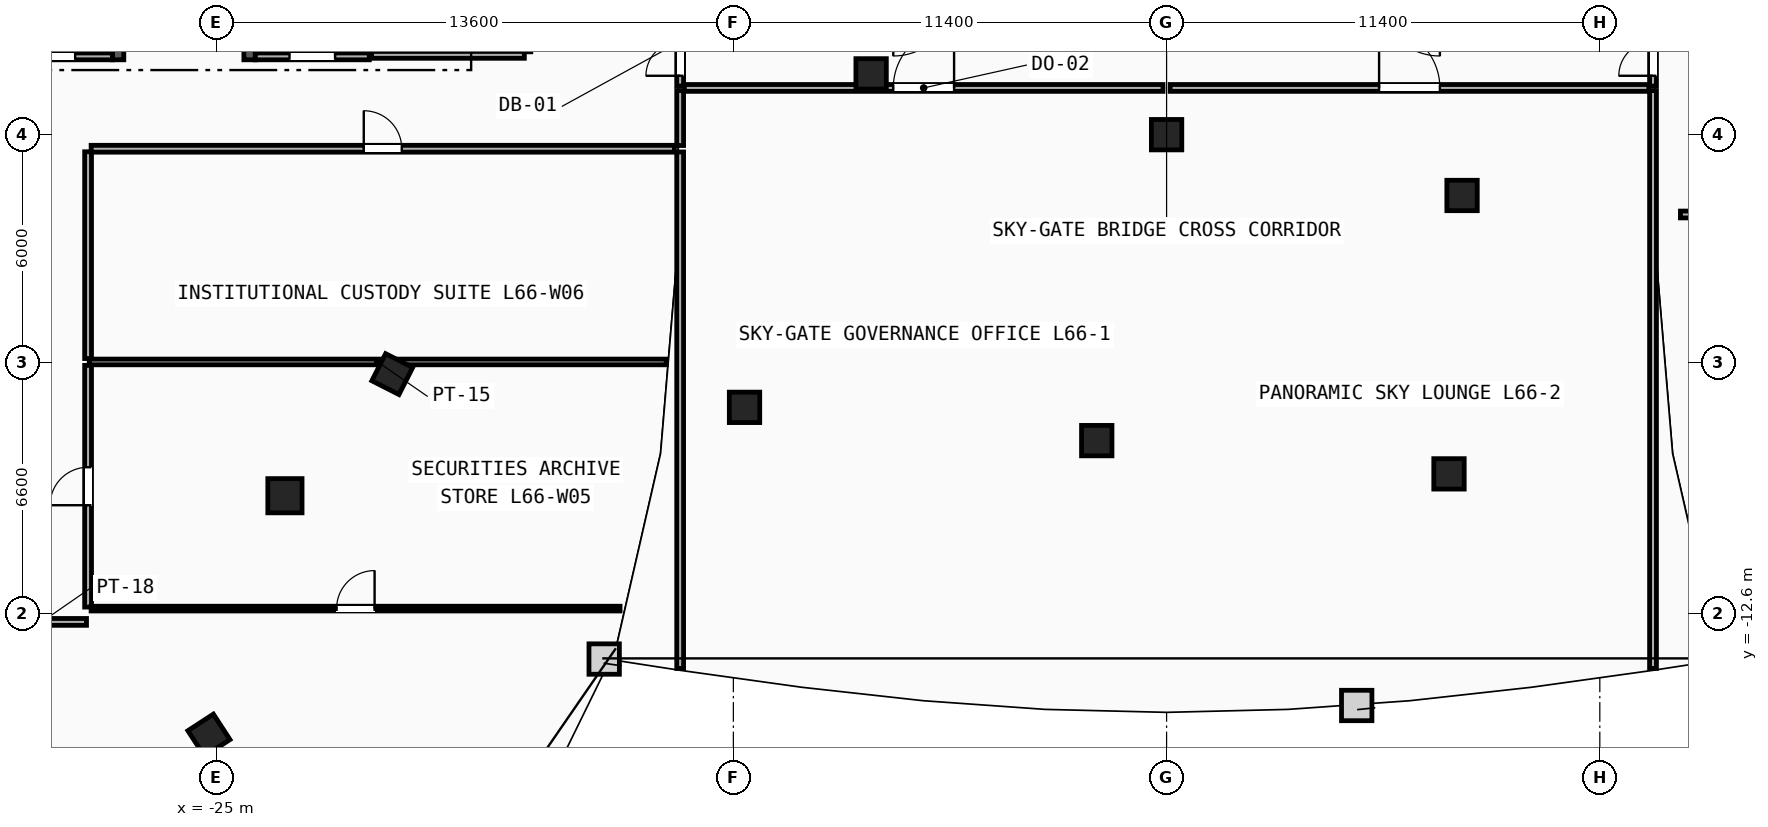
"""IFC4 building model, lengths in metres.
Left out: names, types, materials, properties, quantities, classifications, styles, units other than length and angle.
Written with IfcOpenShell. Run it as: python <this file> out.ifc"""

import sys

from ifc_helpers import new_model, si_unit, direction, frame, frame_2d, origin, origin_2d, place, context, subcontext, project, spatial, rectangle, extrude, element, fill, save


model = new_model("IFC4")
c1 = context("Model", 3, precision=1e-05, world=origin(), true_north=direction((0.0, 1.0)))
c2 = subcontext(c1, "Body", "Model", "MODEL_VIEW")
j1 = project(units=[si_unit("LENGTHUNIT", "METRE"), si_unit("PLANEANGLEUNIT", "RADIAN")], contexts=[c1])
p1 = place(None, origin())
s1 = spatial("IfcSite", under=j1, at=p1, CompositionType="ELEMENT")
p2 = place(p1, origin())
s2 = spatial("IfcBuilding", under=s1, at=p2, CompositionType="ELEMENT")
p3 = place(p2, frame((0.0, 0.0, 250.4)))
s3 = spatial("IfcBuildingStorey", under=s2, at=p3, CompositionType="ELEMENT", Elevation=250.4)
p4 = place(p3, frame((-23.2, -9.5, 0.0), z_axis=(0.0, 0.0, 1.0), x_axis=(1.0, 0.0, 0.0)))
e1 = element("IfcColumn", 1, at=p4, inside=s3, PredefinedType="COLUMN", context=c2, shape_type="SweptSolid", body=[
    extrude(rectangle(XDim=0.9, YDim=0.9, at=origin_2d()), origin(), (0.0, 0.0, 1.0), 3.6),
])
for number, where, z_axis, x_axis in (
    (2, (-25.2, -15.8, 0.0), (0.0, 0.0, 1.0), (0.838, 0.546, 0.0)),
    (3, (-20.375, -6.3, 0.0), (0.0, 0.0, 1.0), (0.453, 0.892, 0.0)),
    (4, (-11.106, -7.175, 0.0), (0.0, 0.0, 1.0), (1.0, 0.0, 0.0)),
    (5, (-1.837, -8.05, 0.0), (0.0, 0.0, 1.0), (1.0, 0.0, 0.0)),
    (6, (7.431, -8.925, 0.0), (0.0, 0.0, 1.0), (1.0, 0.0, 0.0)),
    (7, (-7.775, 1.6, 0.0), (0.0, 0.0, 1.0), (1.0, 0.0, 0.0)),
    (8, (0.0, 0.0, 0.0), (0.0, 0.0, 1.0), (1.0, 0.0, 0.0)),
    (9, (7.775, -1.6, 0.0), (0.0, 0.0, 1.0), (1.0, 0.0, 0.0)),
):
    element("IfcColumn", number, at=place(p3, frame(where, z_axis=z_axis, x_axis=x_axis)), inside=s3, PredefinedType="COLUMN", context=c2, shape_type="SweptSolid", body=[
        extrude(rectangle(XDim=0.8, YDim=0.8, at=origin_2d()), origin(), (0.0, 0.0, 1.0), 3.6),
    ])
for number, where, z_axis, x_axis in (
    (10, (-27.59, 1.97, 0.0), (0.0, 0.0, 1.0), (0.0, 1.0, 0.0)),
    (11, (-24.13, 1.97, 0.0), (0.0, 0.0, 1.0), (0.0, 1.0, 0.0)),
):
    element("IfcWall", number, at=place(p3, frame(where, z_axis=z_axis, x_axis=x_axis)), inside=s3, PredefinedType="SHEAR", context=c2, shape_type="SweptSolid", body=[
        extrude(rectangle(XDim=10.68, YDim=0.3, at=frame_2d((5.34, 0.0))), origin(), (0.0, 0.0, 1.0), 3.34),
    ])
p5 = place(p3, frame((-20.89, 2.15, 0.0), z_axis=(0.0, 0.0, 1.0), x_axis=(0.0, 1.0, 0.0)))
e12 = element("IfcWall", 12, at=p5, inside=s3, PredefinedType="PARTITIONING", context=c2, shape_type="SweptSolid", body=[
    extrude(rectangle(XDim=5.3, YDim=0.18, at=frame_2d((2.65, 0.0))), origin(), (0.0, 0.0, 1.0), 3.34),
])
p6 = place(p3, frame((-23.98, 2.06, 0.0), z_axis=(0.0, 0.0, 1.0), x_axis=(1.0, 0.0, 0.0)))
e13 = element("IfcWall", 13, at=p6, inside=s3, PredefinedType="PARTITIONING", context=c2, shape_type="SweptSolid", body=[
    extrude(rectangle(XDim=3.0, YDim=0.18, at=frame_2d((1.5, 0.0))), origin(), (0.0, 0.0, 1.0), 3.34),
])
p7 = place(p6, frame((0.9, 0.0, 0.0)))
e14 = element("IfcOpeningElement", 14, at=p7, cuts=e13, PredefinedType="OPENING", context=c2, shape_type="SweptSolid", body=[
    extrude(rectangle(XDim=1.2, YDim=2.15, at=frame_2d((0.6, 1.075))), frame((0.0, 0.1, 0.0), z_axis=(0.0, -1.0, 0.0), x_axis=(1.0, 0.0, 0.0)), (0.0, 0.0, 1.0), 0.2),
])
p8 = place(p3, frame((-30.9, 2.06, 0.0), z_axis=(0.0, 0.0, 1.0), x_axis=(1.0, 0.0, 0.0)))
e15 = element("IfcWall", 15, at=p8, inside=s3, PredefinedType="PARTITIONING", context=c2, shape_type="SweptSolid", body=[
    extrude(rectangle(XDim=3.16, YDim=0.18, at=frame_2d((1.58, 0.0))), origin(), (0.0, 0.0, 1.0), 3.34),
])
p9 = place(p8, frame((0.98, 0.0, 0.0)))
e16 = element("IfcOpeningElement", 16, at=p9, cuts=e15, PredefinedType="OPENING", context=c2, shape_type="SweptSolid", body=[
    extrude(rectangle(XDim=1.2, YDim=2.15, at=frame_2d((0.6, 1.075))), frame((0.0, 0.1, 0.0), z_axis=(0.0, -1.0, 0.0), x_axis=(1.0, 0.0, 0.0)), (0.0, 0.0, 1.0), 0.2),
])
p10 = place(p3, frame((-28.35, -5.98, 0.0), z_axis=(0.0, 0.0, 1.0), x_axis=(1.0, 0.0, 0.0)))
e17 = element("IfcWall", 17, at=p10, inside=s3, PredefinedType="PARTITIONING", context=c2, shape_type="SweptSolid", body=[
    extrude(rectangle(XDim=15.185, YDim=0.15, at=frame_2d((7.593, 0.0))), origin(), (0.0, 0.0, 1.0), 3.34),
])
p11 = place(p3, frame((-30.779, -12.82, 0.0), z_axis=(0.0, 0.0, 1.0), x_axis=(1.0, 0.0, 0.0)))
e18 = element("IfcWall", 18, at=p11, inside=s3, PredefinedType="PARTITIONING", context=c2, shape_type="SweptSolid", body=[
    extrude(rectangle(XDim=2.357, YDim=0.18, at=frame_2d((1.179, 0.0))), origin(), (0.0, 0.0, 1.0), 3.34),
])
p12 = place(p3, frame((-28.38, -12.43, 0.0), z_axis=(0.0, 0.0, 1.0), x_axis=(0.0, 1.0, 0.0)))
e19 = element("IfcWall", 19, at=p12, inside=s3, PredefinedType="PARTITIONING", context=c2, shape_type="SweptSolid", body=[
    extrude(rectangle(XDim=6.36, YDim=0.18, at=frame_2d((3.18, 0.0))), origin(), (0.0, 0.0, 1.0), 3.34),
])
p13 = place(p12, frame((2.68, 0.0, 0.0)))
e20 = element("IfcOpeningElement", 20, at=p13, cuts=e19, PredefinedType="OPENING", context=c2, shape_type="SweptSolid", body=[
    extrude(rectangle(XDim=1.0, YDim=2.15, at=frame_2d((0.5, 1.075))), frame((0.0, 0.1, 0.0), z_axis=(0.0, -1.0, 0.0), x_axis=(1.0, 0.0, 0.0)), (0.0, 0.0, 1.0), 0.2),
])
p14 = place(p3, frame((-28.3, -0.37, 0.0), z_axis=(0.0, 0.0, 1.0), x_axis=(1.0, 0.0, 0.0)))
e21 = element("IfcWall", 21, at=p14, inside=s3, PredefinedType="PARTITIONING", context=c2, shape_type="SweptSolid", body=[
    extrude(rectangle(XDim=15.349, YDim=0.18, at=frame_2d((7.675, 0.0))), origin(), (0.0, 0.0, 1.0), 3.34),
])
p15 = place(p14, frame((7.175, 0.0, 0.0)))
e22 = element("IfcOpeningElement", 22, at=p15, cuts=e21, PredefinedType="OPENING", context=c2, shape_type="SweptSolid", body=[
    extrude(rectangle(XDim=1.0, YDim=2.15, at=frame_2d((0.5, 1.075))), frame((0.0, 0.1, 0.0), z_axis=(0.0, -1.0, 0.0), x_axis=(1.0, 0.0, 0.0)), (0.0, 0.0, 1.0), 0.2),
])
p16 = place(p3, frame((-28.38, -5.89, 0.0), z_axis=(0.0, 0.0, 1.0), x_axis=(0.0, 1.0, 0.0)))
e23 = element("IfcWall", 23, at=p16, inside=s3, PredefinedType="PARTITIONING", context=c2, shape_type="SweptSolid", body=[
    extrude(rectangle(XDim=5.44, YDim=0.18, at=frame_2d((2.72, 0.0))), origin(), (0.0, 0.0, 1.0), 3.34),
])
p17 = place(p3, frame((-16.9, 2.1, 0.0), z_axis=(0.0, 0.0, 1.0), x_axis=(-1.0, 0.0, 0.0)))
e24 = element("IfcWall", 24, at=p17, inside=s3, PredefinedType="PARTITIONING", context=c2, shape_type="SweptSolid", body=[
    extrude(rectangle(XDim=4.02, YDim=0.18, at=frame_2d((2.01, 0.0))), origin(), (0.0, 0.0, 1.0), 3.34),
])
p18 = place(p3, frame((-28.3, -12.47, 0.0), z_axis=(0.0, 0.0, 1.0), x_axis=(1.0, 0.0, 0.0)))
e25 = element("IfcWall", 25, at=p18, inside=s3, PredefinedType="PARTITIONING", context=c2, shape_type="SweptSolid", body=[
    extrude(rectangle(XDim=13.919, YDim=0.125, at=frame_2d((6.959, 0.0))), origin(), (0.0, 0.0, 1.0), 3.34),
])
p19 = place(p18, frame((6.459, 0.0, 0.0)))
e26 = element("IfcOpeningElement", 26, at=p19, cuts=e25, PredefinedType="OPENING", context=c2, shape_type="SweptSolid", body=[
    extrude(rectangle(XDim=1.0, YDim=2.15, at=frame_2d((0.5, 1.075))), frame((0.0, 0.073, 0.0), z_axis=(0.0, -1.0, 0.0), x_axis=(1.0, 0.0, 0.0)), (0.0, 0.0, 1.0), 0.145),
])
p20 = place(p3, frame((13.521, -2.1, 0.0), z_axis=(0.0, 0.0, 1.0), x_axis=(1.0, 0.0, 0.0)))
e27 = element("IfcWall", 27, at=p20, inside=s3, PredefinedType="PARTITIONING", context=c2, shape_type="SweptSolid", body=[
    extrude(rectangle(XDim=7.398, YDim=0.18, at=frame_2d((3.699, 0.0))), origin(), (0.0, 0.0, 1.0), 3.34),
])
p21 = place(p3, frame((-12.688, 1.23, 0.0), z_axis=(0.0, 0.0, 1.0), x_axis=(1.0, 0.0, 0.0)))
e28 = element("IfcWall", 28, at=p21, inside=s3, PredefinedType="PARTITIONING", context=c2, shape_type="SweptSolid", body=[
    extrude(rectangle(XDim=12.594, YDim=0.18, at=frame_2d((6.297, 0.0))), origin(), (0.0, 0.0, 1.0), 2.663),
])
p22 = place(p21, frame((5.497, 0.0, 0.0)))
e29 = element("IfcOpeningElement", 29, at=p22, cuts=e28, PredefinedType="OPENING", context=c2, shape_type="SweptSolid", body=[
    extrude(rectangle(XDim=1.6, YDim=2.2, at=frame_2d((0.8, 1.1))), frame((0.0, 0.1, 0.0), z_axis=(0.0, -1.0, 0.0), x_axis=(1.0, 0.0, 0.0)), (0.0, 0.0, 1.0), 0.2),
])
p23 = place(p3, frame((0.095, 1.23, 0.0), z_axis=(0.0, 0.0, 1.0), x_axis=(1.0, 0.0, 0.0)))
e30 = element("IfcWall", 30, at=p23, inside=s3, PredefinedType="PARTITIONING", context=c2, shape_type="SweptSolid", body=[
    extrude(rectangle(XDim=12.594, YDim=0.18, at=frame_2d((6.297, 0.0))), origin(), (0.0, 0.0, 1.0), 3.34),
])
p24 = place(p23, frame((5.497, 0.0, 0.0)))
e31 = element("IfcOpeningElement", 31, at=p24, cuts=e30, PredefinedType="OPENING", context=c2, shape_type="SweptSolid", body=[
    extrude(rectangle(XDim=1.6, YDim=2.2, at=frame_2d((0.8, 1.1))), frame((0.0, 0.1, 0.0), z_axis=(0.0, -1.0, 0.0), x_axis=(1.0, 0.0, 0.0)), (0.0, 0.0, 1.0), 0.2),
])
p25 = place(p3, frame((-12.8, -14.044, 0.0), z_axis=(0.0, 0.0, 1.0), x_axis=(0.0, 1.0, 0.0)))
e32 = element("IfcWall", 32, at=p25, inside=s3, PredefinedType="PARTITIONING", context=c2, shape_type="SweptSolid", body=[
    extrude(rectangle(XDim=13.589, YDim=0.18, at=frame_2d((6.794, 0.0))), origin(), (0.0, 0.0, 1.0), 3.34),
])
p26 = place(p3, frame((-12.8, -0.285, 0.0), z_axis=(0.0, 0.0, 1.0), x_axis=(0.0, 1.0, 0.0)))
e33 = element("IfcWall", 33, at=p26, inside=s3, PredefinedType="PARTITIONING", context=c2, shape_type="SweptSolid", body=[
    extrude(rectangle(XDim=1.445, YDim=0.18, at=frame_2d((0.722, 0.0))), origin(), (0.0, 0.0, 1.0), 3.34),
])
p27 = place(p3, frame((-12.8, 1.28, 0.0), z_axis=(0.0, 0.0, 1.0), x_axis=(0.0, 1.0, 0.0)))
e34 = element("IfcWall", 34, at=p27, inside=s3, PredefinedType="PARTITIONING", context=c2, shape_type="SweptSolid", body=[
    extrude(rectangle(XDim=2.34, YDim=0.18, at=frame_2d((1.17, 0.0))), origin(), (0.0, 0.0, 1.0), 3.34),
])
p28 = place(p27, frame((0.27, 0.0, 0.0)))
e35 = element("IfcOpeningElement", 35, at=p28, cuts=e34, PredefinedType="OPENING", context=c2, shape_type="SweptSolid", body=[
    extrude(rectangle(XDim=1.8, YDim=2.25, at=frame_2d((0.9, 1.125))), frame((0.0, 0.1, 0.0), z_axis=(0.0, -1.0, 0.0), x_axis=(1.0, 0.0, 0.0)), (0.0, 0.0, 1.0), 0.2),
])
p29 = place(p3, frame((12.8, -14.044, 0.0), z_axis=(0.0, 0.0, 1.0), x_axis=(0.0, 1.0, 0.0)))
e36 = element("IfcWall", 36, at=p29, inside=s3, PredefinedType="PARTITIONING", context=c2, shape_type="SweptSolid", body=[
    extrude(rectangle(XDim=15.204, YDim=0.18, at=frame_2d((7.602, 0.0))), origin(), (0.0, 0.0, 1.0), 3.34),
])
p30 = place(p3, frame((12.8, 1.28, 0.0), z_axis=(0.0, 0.0, 1.0), x_axis=(0.0, 1.0, 0.0)))
e37 = element("IfcWall", 37, at=p30, inside=s3, PredefinedType="PARTITIONING", context=c2, shape_type="SweptSolid", body=[
    extrude(rectangle(XDim=2.34, YDim=0.18, at=frame_2d((1.17, 0.0))), origin(), (0.0, 0.0, 1.0), 3.34),
])
p31 = place(p30, frame((0.27, 0.0, 0.0)))
e38 = element("IfcOpeningElement", 38, at=p31, cuts=e37, PredefinedType="OPENING", context=c2, shape_type="SweptSolid", body=[
    extrude(rectangle(XDim=1.8, YDim=2.25, at=frame_2d((0.9, 1.125))), frame((0.0, 0.1, 0.0), z_axis=(0.0, -1.0, 0.0), x_axis=(1.0, 0.0, 0.0)), (0.0, 0.0, 1.0), 0.2),
])
p32 = place(p7, origin())
e39 = element("IfcDoor", 39, at=p32, inside=s3, OperationType="SINGLE_SWING_RIGHT", PredefinedType="DOOR", context=c2, shape_type="SweptSolid", body=[
    extrude(rectangle(XDim=1.2, YDim=2.15, at=frame_2d((0.6, 1.075))), frame((0.0, 0.025, 0.0), z_axis=(0.0, -1.0, 0.0), x_axis=(1.0, 0.0, 0.0)), (0.0, 0.0, 1.0), 0.05),
])
fill(e14, e39)
p33 = place(p9, origin())
e40 = element("IfcDoor", 40, at=p33, inside=s3, OperationType="SINGLE_SWING_LEFT", PredefinedType="DOOR", context=c2, shape_type="SweptSolid", body=[
    extrude(rectangle(XDim=1.2, YDim=2.15, at=frame_2d((0.6, 1.075))), frame((0.0, 0.025, 0.0), z_axis=(0.0, -1.0, 0.0), x_axis=(1.0, 0.0, 0.0)), (0.0, 0.0, 1.0), 0.05),
])
fill(e16, e40)
p34 = place(p15, origin())
e41 = element("IfcDoor", 41, at=p34, inside=s3, OperationType="SINGLE_SWING_LEFT", PredefinedType="DOOR", context=c2, shape_type="SweptSolid", body=[
    extrude(rectangle(XDim=1.0, YDim=2.15, at=frame_2d((0.5, 1.075))), frame((0.0, 0.025, 0.0), z_axis=(0.0, -1.0, 0.0), x_axis=(1.0, 0.0, 0.0)), (0.0, 0.0, 1.0), 0.05),
])
fill(e22, e41)
p35 = place(p19, origin())
e42 = element("IfcDoor", 42, at=p35, inside=s3, OperationType="SINGLE_SWING_RIGHT", PredefinedType="DOOR", context=c2, shape_type="SweptSolid", body=[
    extrude(rectangle(XDim=1.0, YDim=2.15, at=frame_2d((0.5, 1.075))), frame((0.0, 0.025, 0.0), z_axis=(0.0, -1.0, 0.0), x_axis=(1.0, 0.0, 0.0)), (0.0, 0.0, 1.0), 0.05),
])
fill(e26, e42)
p36 = place(p22, origin())
e43 = element("IfcDoor", 43, at=p36, inside=s3, OperationType="SINGLE_SWING_RIGHT", PredefinedType="DOOR", context=c2, shape_type="SweptSolid", body=[
    extrude(rectangle(XDim=1.6, YDim=2.2, at=frame_2d((0.8, 1.1))), frame((0.0, 0.025, 0.0), z_axis=(0.0, -1.0, 0.0), x_axis=(1.0, 0.0, 0.0)), (0.0, 0.0, 1.0), 0.05),
])
fill(e29, e43)
p37 = place(p24, origin())
e44 = element("IfcDoor", 44, at=p37, inside=s3, OperationType="SINGLE_SWING_LEFT", PredefinedType="DOOR", context=c2, shape_type="SweptSolid", body=[
    extrude(rectangle(XDim=1.6, YDim=2.2, at=frame_2d((0.8, 1.1))), frame((0.0, 0.025, 0.0), z_axis=(0.0, -1.0, 0.0), x_axis=(1.0, 0.0, 0.0)), (0.0, 0.0, 1.0), 0.05),
])
fill(e31, e44)
p38 = place(p13, origin())
e45 = element("IfcDoor", 45, at=p38, inside=s3, OperationType="SINGLE_SWING_LEFT", PredefinedType="DOOR", context=c2, shape_type="SweptSolid", body=[
    extrude(rectangle(XDim=1.0, YDim=2.15, at=frame_2d((0.5, 1.075))), frame((0.0, 0.025, 0.0), z_axis=(0.0, -1.0, 0.0), x_axis=(1.0, 0.0, 0.0)), (0.0, 0.0, 1.0), 0.05),
])
fill(e20, e45)
p39 = place(p28, origin())
e46 = element("IfcDoor", 46, at=p39, inside=s3, OperationType="DOUBLE_DOOR_SINGLE_SWING", PredefinedType="DOOR", context=c2, shape_type="SweptSolid", body=[
    extrude(rectangle(XDim=1.8, YDim=2.25, at=frame_2d((0.9, 1.125))), frame((0.0, 0.025, 0.0), z_axis=(0.0, -1.0, 0.0), x_axis=(1.0, 0.0, 0.0)), (0.0, 0.0, 1.0), 0.05),
])
fill(e35, e46)
p40 = place(p31, origin())
e47 = element("IfcDoor", 47, at=p40, inside=s3, OperationType="DOUBLE_DOOR_SINGLE_SWING", PredefinedType="DOOR", context=c2, shape_type="SweptSolid", body=[
    extrude(rectangle(XDim=1.8, YDim=2.25, at=frame_2d((0.9, 1.125))), frame((0.0, 0.025, 0.0), z_axis=(0.0, -1.0, 0.0), x_axis=(1.0, 0.0, 0.0)), (0.0, 0.0, 1.0), 0.05),
])
fill(e38, e47)
save(model, sys.argv[1])
